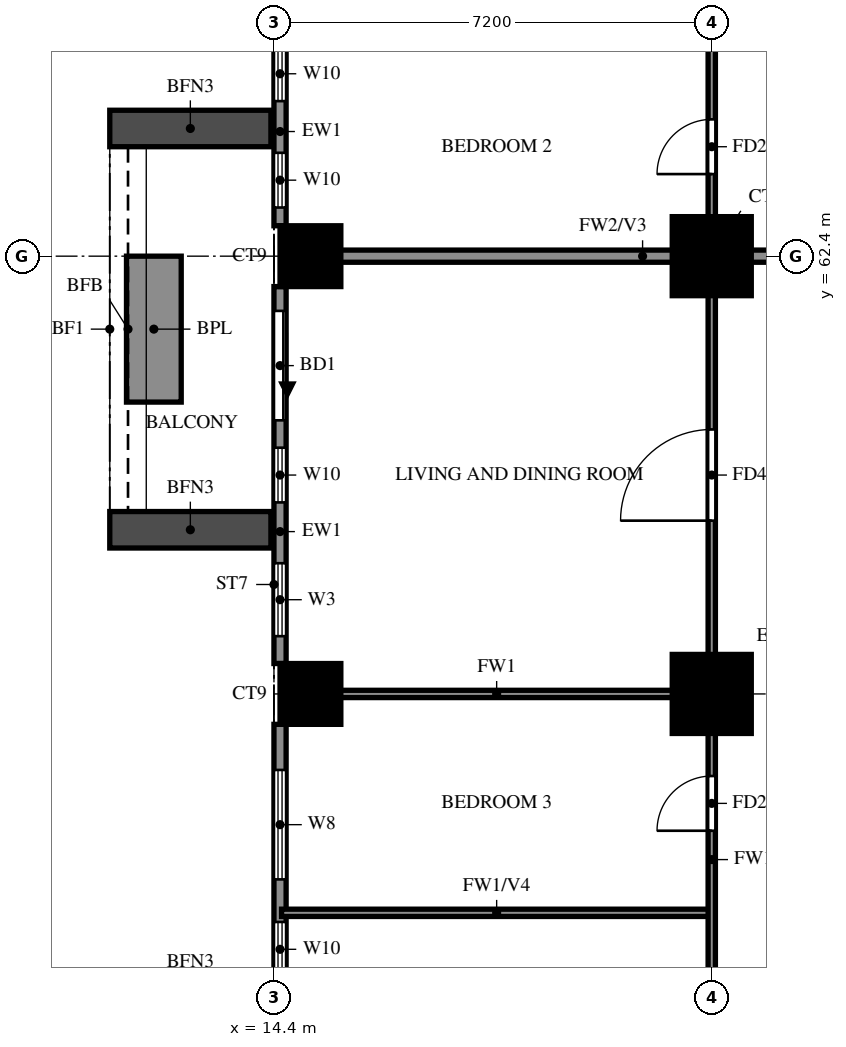
"""IFC4 building model, lengths in metres.
Left out: names, types, materials, properties, quantities, classifications, styles, units other than length and angle.
Written with IfcOpenShell. Run it as: python <this file> out.ifc"""

import sys

from ifc_helpers import new_model, si_unit, direction, frame, frame_2d, origin, origin_2d, place, context, subcontext, project, spatial, rectangle, extrude, source, transform, mapped, element, fill, save


model = new_model("IFC4")
c1 = context("Model", 3, precision=1e-05, world=origin(), true_north=direction((0.0, 1.0)))
c2 = subcontext(c1, "Body", "Model", "MODEL_VIEW")
j1 = project(units=[si_unit("LENGTHUNIT", "METRE"), si_unit("PLANEANGLEUNIT", "RADIAN")], contexts=[c1])
p1 = place(None, origin())
s1 = spatial("IfcSite", under=j1, at=p1, CompositionType="ELEMENT")
p2 = place(p1, origin())
s2 = spatial("IfcBuilding", under=s1, at=p2, CompositionType="ELEMENT")
p3 = place(p2, frame((0.0, 0.0, 65.5)))
s3 = spatial("IfcBuildingStorey", under=s2, at=p3, CompositionType="ELEMENT", Elevation=65.5)
m1 = source(origin(), c2, "Body", "SweptSolid", [
    extrude(rectangle(XDim=1.0, YDim=1.0, at=origin_2d()), origin(), (0.0, 0.0, 1.0), 3.18),
])
p4 = place(p3, frame((15.0, 55.2, 0.0), z_axis=(0.0, 0.0, 1.0), x_axis=(1.0, 0.0, 0.0)))
e1 = element("IfcColumn", 1, at=p4, inside=s3, PredefinedType="COLUMN", context=c2, shape_type="MappedRepresentation", body=[
    mapped(m1, transform((0.0, 0.0, 0.0))),
])
m2 = source(origin(), c2, "Body", "SweptSolid", [
    extrude(rectangle(XDim=1.3, YDim=1.3, at=origin_2d()), origin(), (0.0, 0.0, 1.0), 3.18),
])
p5 = place(p3, frame((21.6, 55.2, 0.0), z_axis=(0.0, 0.0, 1.0), x_axis=(1.0, 0.0, 0.0)))
e2 = element("IfcColumn", 2, at=p5, inside=s3, PredefinedType="COLUMN", context=c2, shape_type="MappedRepresentation", body=[
    mapped(m2, transform((0.0, 0.0, 0.0))),
])
p6 = place(p3, frame((15.0, 62.4, 0.0), z_axis=(0.0, 0.0, 1.0), x_axis=(1.0, 0.0, 0.0)))
e3 = element("IfcColumn", 3, at=p6, inside=s3, PredefinedType="COLUMN", context=c2, shape_type="MappedRepresentation", body=[
    mapped(m1, transform((0.0, 0.0, 0.0))),
])
p7 = place(p3, frame((21.6, 62.4, 0.0), z_axis=(0.0, 0.0, 1.0), x_axis=(1.0, 0.0, 0.0)))
e4 = element("IfcColumn", 4, at=p7, inside=s3, PredefinedType="COLUMN", context=c2, shape_type="MappedRepresentation", body=[
    mapped(m2, transform((0.0, 0.0, 0.0))),
])
p8 = place(p3, frame((14.5, 69.1, 0.0), z_axis=(0.0, 0.0, 1.0), x_axis=(0.0, -1.0, 0.0)))
e5 = element("IfcWall", 5, at=p8, inside=s3, PredefinedType="SOLIDWALL", context=c2, shape_type="SweptSolid", body=[
    extrude(rectangle(XDim=6.2, YDim=0.2, at=frame_2d((3.1, 0.0))), origin(), (0.0, 0.0, 1.0), 3.18),
])
p9 = place(p8, frame((3.25, 0.0, 0.6)))
e6 = element("IfcOpeningElement", 6, at=p9, cuts=e5, PredefinedType="OPENING", context=c2, shape_type="SweptSolid", body=[
    extrude(rectangle(XDim=0.9, YDim=2.4, at=frame_2d((0.45, 1.2))), frame((0.0, 0.11, 0.0), z_axis=(0.0, -1.0, 0.0), x_axis=(1.0, 0.0, 0.0)), (0.0, 0.0, 1.0), 0.22),
])
p10 = place(p8, frame((5.0, 0.0, 0.6)))
e7 = element("IfcOpeningElement", 7, at=p10, cuts=e5, PredefinedType="OPENING", context=c2, shape_type="SweptSolid", body=[
    extrude(rectangle(XDim=0.9, YDim=2.4, at=frame_2d((0.45, 1.2))), frame((0.0, 0.11, 0.0), z_axis=(0.0, -1.0, 0.0), x_axis=(1.0, 0.0, 0.0)), (0.0, 0.0, 1.0), 0.22),
])
p11 = place(p8, frame((0.75, 0.0, 0.6)))
e8 = element("IfcOpeningElement", 8, at=p11, cuts=e5, PredefinedType="OPENING", context=c2, shape_type="SweptSolid", body=[
    extrude(rectangle(XDim=1.8, YDim=2.4, at=frame_2d((0.9, 1.2))), frame((0.0, 0.11, 0.0), z_axis=(0.0, -1.0, 0.0), x_axis=(1.0, 0.0, 0.0)), (0.0, 0.0, 1.0), 0.22),
])
p12 = place(p3, frame((14.5, 61.9, 0.0), z_axis=(0.0, 0.0, 1.0), x_axis=(0.0, -1.0, 0.0)))
e9 = element("IfcWall", 9, at=p12, inside=s3, PredefinedType="SOLIDWALL", context=c2, shape_type="SweptSolid", body=[
    extrude(rectangle(XDim=6.2, YDim=0.2, at=frame_2d((3.1, 0.0))), origin(), (0.0, 0.0, 1.0), 3.18),
])
p13 = place(p12, frame((0.4, 0.0, 0.0)))
e10 = element("IfcOpeningElement", 10, at=p13, cuts=e9, PredefinedType="OPENING", context=c2, shape_type="SweptSolid", body=[
    extrude(rectangle(XDim=1.8, YDim=2.4, at=frame_2d((0.9, 1.2))), frame((0.0, 0.11, 0.0), z_axis=(0.0, -1.0, 0.0), x_axis=(1.0, 0.0, 0.0)), (0.0, 0.0, 1.0), 0.22),
])
p14 = place(p12, frame((2.65, 0.0, 0.6)))
e11 = element("IfcOpeningElement", 11, at=p14, cuts=e9, PredefinedType="OPENING", context=c2, shape_type="SweptSolid", body=[
    extrude(rectangle(XDim=0.9, YDim=2.4, at=frame_2d((0.45, 1.2))), frame((0.0, 0.11, 0.0), z_axis=(0.0, -1.0, 0.0), x_axis=(1.0, 0.0, 0.0)), (0.0, 0.0, 1.0), 0.22),
])
p15 = place(p12, frame((4.55, 0.0, 0.6)))
e12 = element("IfcOpeningElement", 12, at=p15, cuts=e9, PredefinedType="OPENING", context=c2, shape_type="SweptSolid", body=[
    extrude(rectangle(XDim=1.2, YDim=2.4, at=frame_2d((0.6, 1.2))), frame((0.0, 0.11, 0.0), z_axis=(0.0, -1.0, 0.0), x_axis=(1.0, 0.0, 0.0)), (0.0, 0.0, 1.0), 0.22),
])
p16 = place(p3, frame((14.5, 54.7, 0.0), z_axis=(0.0, 0.0, 1.0), x_axis=(0.0, -1.0, 0.0)))
e13 = element("IfcWall", 13, at=p16, inside=s3, PredefinedType="SOLIDWALL", context=c2, shape_type="SweptSolid", body=[
    extrude(rectangle(XDim=6.2, YDim=0.2, at=frame_2d((3.1, 0.0))), origin(), (0.0, 0.0, 1.0), 3.18),
])
p17 = place(p16, frame((3.25, 0.0, 0.6)))
e14 = element("IfcOpeningElement", 14, at=p17, cuts=e13, PredefinedType="OPENING", context=c2, shape_type="SweptSolid", body=[
    extrude(rectangle(XDim=0.9, YDim=2.4, at=frame_2d((0.45, 1.2))), frame((0.0, 0.11, 0.0), z_axis=(0.0, -1.0, 0.0), x_axis=(1.0, 0.0, 0.0)), (0.0, 0.0, 1.0), 0.22),
])
p18 = place(p16, frame((0.75, 0.0, 0.6)))
e15 = element("IfcOpeningElement", 15, at=p18, cuts=e13, PredefinedType="OPENING", context=c2, shape_type="SweptSolid", body=[
    extrude(rectangle(XDim=1.8, YDim=2.4, at=frame_2d((0.9, 1.2))), frame((0.0, 0.11, 0.0), z_axis=(0.0, -1.0, 0.0), x_axis=(1.0, 0.0, 0.0)), (0.0, 0.0, 1.0), 0.22),
])
for number, where, z_axis, x_axis in (
    (16, (14.35, 64.5, 0.0), (0.0, 0.0, 1.0), (-1.0, 0.0, 0.0)),
    (17, (14.35, 57.9, 0.0), (0.0, 0.0, 1.0), (-1.0, 0.0, 0.0)),
):
    element("IfcWall", number, at=place(p3, frame(where, z_axis=z_axis, x_axis=x_axis)), inside=s3, PredefinedType="SOLIDWALL", context=c2, shape_type="SweptSolid", body=[
        extrude(rectangle(XDim=2.65, YDim=0.6, at=frame_2d((1.325, 0.0))), origin(), (0.0, 0.0, 1.0), 2.85),
    ])
p19 = place(p3, frame((12.425, 62.4, 0.0), z_axis=(0.0, 0.0, 1.0), x_axis=(0.0, -1.0, 0.0)))
e18 = element("IfcWall", 18, at=p19, inside=s3, PredefinedType="SOLIDWALL", context=c2, shape_type="SweptSolid", body=[
    extrude(rectangle(XDim=2.4, YDim=0.9, at=frame_2d((1.2, 0.0))), origin(), (0.0, 0.0, 1.0), 0.9),
])
p20 = place(p3, frame((14.525, 62.4, 0.0), z_axis=(0.0, 0.0, 1.0), x_axis=(1.0, 0.0, 0.0)))
e19 = element("IfcWall", 19, at=p20, inside=s3, PredefinedType="SOLIDWALL", context=c2, shape_type="SweptSolid", body=[
    extrude(rectangle(XDim=11.875, YDim=0.2, at=frame_2d((5.938, 0.0))), origin(), (0.0, 0.0, 1.0), 3.18),
])
p21 = place(p3, frame((14.525, 51.6, 0.0), z_axis=(0.0, 0.0, 1.0), x_axis=(1.0, 0.0, 0.0)))
e20 = element("IfcWall", 20, at=p21, inside=s3, PredefinedType="PARTITIONING", context=c2, shape_type="SweptSolid", body=[
    extrude(rectangle(XDim=7.075, YDim=0.12, at=frame_2d((3.538, 0.0))), origin(), (0.0, 0.0, 1.0), 2.28),
])
p22 = place(p3, frame((14.525, 55.2, 0.0), z_axis=(0.0, 0.0, 1.0), x_axis=(1.0, 0.0, 0.0)))
e21 = element("IfcWall", 21, at=p22, inside=s3, PredefinedType="PARTITIONING", context=c2, shape_type="SweptSolid", body=[
    extrude(rectangle(XDim=7.075, YDim=0.12, at=frame_2d((3.538, 0.0))), origin(), (0.0, 0.0, 1.0), 3.18),
])
p23 = place(p3, frame((21.6, 33.725, 0.0), z_axis=(0.0, 0.0, 1.0), x_axis=(0.0, 1.0, 0.0)))
e22 = element("IfcWall", 22, at=p23, inside=s3, PredefinedType="PARTITIONING", context=c2, shape_type="SweptSolid", body=[
    extrude(rectangle(XDim=39.475, YDim=0.12, at=frame_2d((19.737, 0.0))), origin(), (0.0, 0.0, 1.0), 3.18),
])
p24 = place(p23, frame((7.775, 0.0, 0.0)))
e23 = element("IfcOpeningElement", 23, at=p24, cuts=e22, PredefinedType="OPENING", context=c2, shape_type="SweptSolid", body=[
    extrude(rectangle(XDim=0.9, YDim=2.1, at=frame_2d((0.45, 1.05))), frame((0.0, 0.07, 0.0), z_axis=(0.0, -1.0, 0.0), x_axis=(1.0, 0.0, 0.0)), (0.0, 0.0, 1.0), 0.14),
])
p25 = place(p23, frame((15.625, 0.0, 0.0)))
e24 = element("IfcOpeningElement", 24, at=p25, cuts=e22, PredefinedType="OPENING", context=c2, shape_type="SweptSolid", body=[
    extrude(rectangle(XDim=0.9, YDim=2.1, at=frame_2d((0.45, 1.05))), frame((0.0, 0.07, 0.0), z_axis=(0.0, -1.0, 0.0), x_axis=(1.0, 0.0, 0.0)), (0.0, 0.0, 1.0), 0.14),
])
p26 = place(p23, frame((19.225, 0.0, 0.0)))
e25 = element("IfcOpeningElement", 25, at=p26, cuts=e22, PredefinedType="OPENING", context=c2, shape_type="SweptSolid", body=[
    extrude(rectangle(XDim=0.9, YDim=2.1, at=frame_2d((0.45, 1.05))), frame((0.0, 0.07, 0.0), z_axis=(0.0, -1.0, 0.0), x_axis=(1.0, 0.0, 0.0)), (0.0, 0.0, 1.0), 0.14),
])
p27 = place(p23, frame((24.325, 0.0, 0.0)))
e26 = element("IfcOpeningElement", 26, at=p27, cuts=e22, PredefinedType="OPENING", context=c2, shape_type="SweptSolid", body=[
    extrude(rectangle(XDim=1.5, YDim=2.1, at=frame_2d((0.75, 1.05))), frame((0.0, 0.07, 0.0), z_axis=(0.0, -1.0, 0.0), x_axis=(1.0, 0.0, 0.0)), (0.0, 0.0, 1.0), 0.14),
])
p28 = place(p23, frame((30.025, 0.0, 0.0)))
e27 = element("IfcOpeningElement", 27, at=p28, cuts=e22, PredefinedType="OPENING", context=c2, shape_type="SweptSolid", body=[
    extrude(rectangle(XDim=0.9, YDim=2.1, at=frame_2d((0.45, 1.05))), frame((0.0, 0.07, 0.0), z_axis=(0.0, -1.0, 0.0), x_axis=(1.0, 0.0, 0.0)), (0.0, 0.0, 1.0), 0.14),
])
p29 = place(p23, frame((33.625, 0.0, 0.0)))
e28 = element("IfcOpeningElement", 28, at=p29, cuts=e22, PredefinedType="OPENING", context=c2, shape_type="SweptSolid", body=[
    extrude(rectangle(XDim=0.9, YDim=2.1, at=frame_2d((0.45, 1.05))), frame((0.0, 0.07, 0.0), z_axis=(0.0, -1.0, 0.0), x_axis=(1.0, 0.0, 0.0)), (0.0, 0.0, 1.0), 0.14),
])
p30 = place(p23, frame((37.225, 0.0, 0.0)))
e29 = element("IfcOpeningElement", 29, at=p30, cuts=e22, PredefinedType="OPENING", context=c2, shape_type="SweptSolid", body=[
    extrude(rectangle(XDim=0.9, YDim=2.1, at=frame_2d((0.45, 1.05))), frame((0.0, 0.07, 0.0), z_axis=(0.0, -1.0, 0.0), x_axis=(1.0, 0.0, 0.0)), (0.0, 0.0, 1.0), 0.14),
])
p31 = place(p9, origin())
e30 = element("IfcWindow", 30, at=p31, inside=s3, PartitioningType="SINGLE_PANEL", PredefinedType="WINDOW", context=c2, shape_type="SweptSolid", body=[
    extrude(rectangle(XDim=0.9, YDim=2.4, at=frame_2d((0.45, 1.2))), frame((0.0, 0.03, 0.0), z_axis=(0.0, -1.0, 0.0), x_axis=(1.0, 0.0, 0.0)), (0.0, 0.0, 1.0), 0.06),
])
fill(e6, e30)
p32 = place(p10, origin())
e31 = element("IfcWindow", 31, at=p32, inside=s3, PartitioningType="SINGLE_PANEL", PredefinedType="WINDOW", context=c2, shape_type="SweptSolid", body=[
    extrude(rectangle(XDim=0.9, YDim=2.4, at=frame_2d((0.45, 1.2))), frame((0.0, 0.03, 0.0), z_axis=(0.0, -1.0, 0.0), x_axis=(1.0, 0.0, 0.0)), (0.0, 0.0, 1.0), 0.06),
])
fill(e7, e31)
p33 = place(p13, origin())
e32 = element("IfcDoor", 32, at=p33, inside=s3, OperationType="DOUBLE_DOOR_SLIDING", PredefinedType="DOOR", context=c2, shape_type="SweptSolid", body=[
    extrude(rectangle(XDim=1.8, YDim=2.4, at=frame_2d((0.9, 1.2))), frame((0.0, 0.025, 0.0), z_axis=(0.0, -1.0, 0.0), x_axis=(1.0, 0.0, 0.0)), (0.0, 0.0, 1.0), 0.05),
])
fill(e10, e32)
p34 = place(p14, origin())
e33 = element("IfcWindow", 33, at=p34, inside=s3, PartitioningType="SINGLE_PANEL", PredefinedType="WINDOW", context=c2, shape_type="SweptSolid", body=[
    extrude(rectangle(XDim=0.9, YDim=2.4, at=frame_2d((0.45, 1.2))), frame((0.0, 0.03, 0.0), z_axis=(0.0, -1.0, 0.0), x_axis=(1.0, 0.0, 0.0)), (0.0, 0.0, 1.0), 0.06),
])
fill(e11, e33)
p35 = place(p15, origin())
e34 = element("IfcWindow", 34, at=p35, inside=s3, PartitioningType="SINGLE_PANEL", PredefinedType="WINDOW", context=c2, shape_type="SweptSolid", body=[
    extrude(rectangle(XDim=1.2, YDim=2.4, at=frame_2d((0.6, 1.2))), frame((0.0, 0.03, 0.0), z_axis=(0.0, -1.0, 0.0), x_axis=(1.0, 0.0, 0.0)), (0.0, 0.0, 1.0), 0.06),
])
fill(e12, e34)
p36 = place(p17, origin())
e35 = element("IfcWindow", 35, at=p36, inside=s3, PartitioningType="SINGLE_PANEL", PredefinedType="WINDOW", context=c2, shape_type="SweptSolid", body=[
    extrude(rectangle(XDim=0.9, YDim=2.4, at=frame_2d((0.45, 1.2))), frame((0.0, 0.03, 0.0), z_axis=(0.0, -1.0, 0.0), x_axis=(1.0, 0.0, 0.0)), (0.0, 0.0, 1.0), 0.06),
])
fill(e14, e35)
p37 = place(p18, origin())
e36 = element("IfcWindow", 36, at=p37, inside=s3, PartitioningType="DOUBLE_PANEL_VERTICAL", PredefinedType="WINDOW", context=c2, shape_type="SweptSolid", body=[
    extrude(rectangle(XDim=1.8, YDim=2.4, at=frame_2d((0.9, 1.2))), frame((0.0, 0.03, 0.0), z_axis=(0.0, -1.0, 0.0), x_axis=(1.0, 0.0, 0.0)), (0.0, 0.0, 1.0), 0.06),
])
fill(e15, e36)
p38 = place(p26, origin())
e37 = element("IfcDoor", 37, at=p38, inside=s3, OperationType="SINGLE_SWING_LEFT", PredefinedType="DOOR", context=c2, shape_type="SweptSolid", body=[
    extrude(rectangle(XDim=0.9, YDim=2.1, at=frame_2d((0.45, 1.05))), frame((0.0, 0.025, 0.0), z_axis=(0.0, -1.0, 0.0), x_axis=(1.0, 0.0, 0.0)), (0.0, 0.0, 1.0), 0.05),
])
fill(e25, e37)
p39 = place(p27, origin())
e38 = element("IfcDoor", 38, at=p39, inside=s3, OperationType="SINGLE_SWING_RIGHT", PredefinedType="DOOR", context=c2, shape_type="SweptSolid", body=[
    extrude(rectangle(XDim=1.5, YDim=2.1, at=frame_2d((0.75, 1.05))), frame((0.0, 0.025, 0.0), z_axis=(0.0, -1.0, 0.0), x_axis=(1.0, 0.0, 0.0)), (0.0, 0.0, 1.0), 0.05),
])
fill(e26, e38)
p40 = place(p28, origin())
e39 = element("IfcDoor", 39, at=p40, inside=s3, OperationType="SINGLE_SWING_LEFT", PredefinedType="DOOR", context=c2, shape_type="SweptSolid", body=[
    extrude(rectangle(XDim=0.9, YDim=2.1, at=frame_2d((0.45, 1.05))), frame((0.0, 0.025, 0.0), z_axis=(0.0, -1.0, 0.0), x_axis=(1.0, 0.0, 0.0)), (0.0, 0.0, 1.0), 0.05),
])
fill(e27, e39)
save(model, sys.argv[1])
